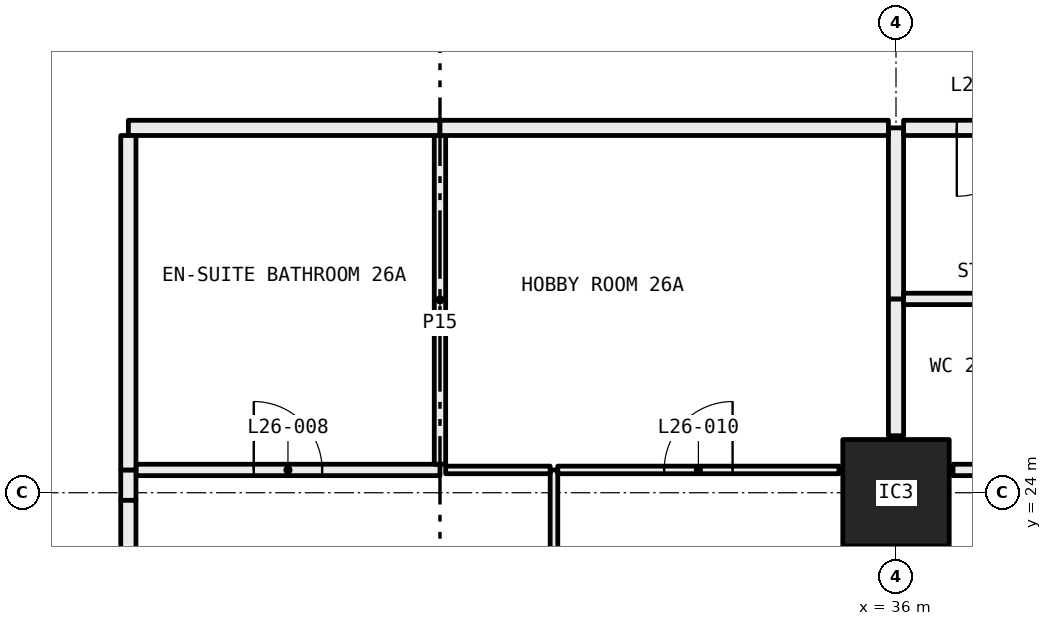
"""IFC4 building model, lengths in metres.
Left out: names, types, materials, properties, quantities, classifications, styles, units other than length and angle.
Written with IfcOpenShell. Run it as: python <this file> out.ifc"""

import sys

from ifc_helpers import new_model, si_unit, direction, frame, frame_2d, origin, origin_2d, place, context, subcontext, project, spatial, rectangle, hollow_rectangle, extrude, element, fill, save


model = new_model("IFC4")
c1 = context("Model", 3, precision=1e-05, world=origin(), true_north=direction((0.0, 1.0)))
c2 = subcontext(c1, "Body", "Model", "MODEL_VIEW")
j1 = project(units=[si_unit("LENGTHUNIT", "METRE"), si_unit("PLANEANGLEUNIT", "RADIAN")], contexts=[c1])
p1 = place(None, origin())
s1 = spatial("IfcSite", under=j1, at=p1, CompositionType="ELEMENT")
p2 = place(p1, origin())
s2 = spatial("IfcBuilding", under=s1, at=p2, CompositionType="ELEMENT")
p3 = place(p2, frame((0.0, 0.0, 103.5)))
s3 = spatial("IfcBuildingStorey", under=s2, at=p3, CompositionType="ELEMENT", Elevation=103.5)
p4 = place(p3, frame((36.0, 24.0, 0.0), z_axis=(0.0, 0.0, 1.0), x_axis=(1.0, 0.0, 0.0)))
e1 = element("IfcColumn", 1, at=p4, inside=s3, PredefinedType="COLUMN", context=c2, shape_type="SweptSolid", body=[
    extrude(hollow_rectangle(XDim=1.4, YDim=1.4, WallThickness=0.06, at=origin_2d()), origin(), (0.0, 0.0, 1.0), 3.05),
])
p5 = place(p3, frame((31.5, 18.075, 0.0), z_axis=(0.0, 0.0, 1.0), x_axis=(0.0, 1.0, 0.0)))
e2 = element("IfcWall", 2, at=p5, inside=s3, PredefinedType="PARTITIONING", context=c2, shape_type="SweptSolid", body=[
    extrude(rectangle(XDim=6.225, YDim=0.1, at=frame_2d((3.113, 0.0))), origin(), (0.0, 0.0, 1.0), 2.45),
])
p6 = place(p5, frame((2.663, 0.0, 0.0)))
e3 = element("IfcOpeningElement", 3, at=p6, cuts=e2, PredefinedType="OPENING", context=c2, shape_type="SweptSolid", body=[
    extrude(rectangle(XDim=0.9, YDim=2.1, at=frame_2d((0.45, 1.05))), frame((0.0, 0.06, 0.0), z_axis=(0.0, -1.0, 0.0), x_axis=(1.0, 0.0, 0.0)), (0.0, 0.0, 1.0), 0.12),
])
p7 = place(p3, frame((30.0, 24.3, 0.0), z_axis=(0.0, 0.0, 1.0), x_axis=(-1.0, 0.0, 0.0)))
e4 = element("IfcWall", 4, at=p7, inside=s3, PredefinedType="PARTITIONING", context=c2, shape_type="SweptSolid", body=[
    extrude(rectangle(XDim=4.0, YDim=0.15, at=frame_2d((2.0, 0.0))), origin(), (0.0, 0.0, 1.0), 3.05),
])
p8 = place(p7, frame((1.55, 0.0, 0.0)))
e5 = element("IfcOpeningElement", 5, at=p8, cuts=e4, PredefinedType="OPENING", context=c2, shape_type="SweptSolid", body=[
    extrude(rectangle(XDim=0.9, YDim=2.1, at=frame_2d((0.45, 1.05))), frame((0.0, 0.085, 0.0), z_axis=(0.0, -1.0, 0.0), x_axis=(1.0, 0.0, 0.0)), (0.0, 0.0, 1.0), 0.17),
])
p9 = place(p3, frame((31.45, 24.3, 0.0), z_axis=(0.0, 0.0, 1.0), x_axis=(-1.0, 0.0, 0.0)))
e6 = element("IfcWall", 6, at=p9, inside=s3, PredefinedType="PARTITIONING", context=c2, shape_type="SweptSolid", body=[
    extrude(rectangle(XDim=1.375, YDim=0.1, at=frame_2d((0.688, 0.0))), origin(), (0.0, 0.0, 1.0), 3.05),
])
p10 = place(p3, frame((25.9, 24.3, 0.0), z_axis=(0.0, 0.0, 1.0), x_axis=(0.0, -1.0, 0.0)))
e7 = element("IfcWall", 7, at=p10, inside=s3, PredefinedType="PARTITIONING", context=c2, shape_type="SweptSolid", body=[
    extrude(rectangle(XDim=0.4, YDim=0.2, at=frame_2d((0.2, 0.0))), origin(), (0.0, 0.0, 1.0), 2.45),
])
p11 = place(p3, frame((25.9, 23.9, 0.0), z_axis=(0.0, 0.0, 1.0), x_axis=(0.0, -1.0, 0.0)))
e8 = element("IfcWall", 8, at=p11, inside=s3, PredefinedType="PARTITIONING", context=c2, shape_type="SweptSolid", body=[
    extrude(rectangle(XDim=5.8, YDim=0.2, at=frame_2d((2.9, 0.0))), origin(), (0.0, 0.0, 1.0), 3.05),
])
p12 = place(p3, frame((35.25, 24.3, 0.0), z_axis=(0.0, 0.0, 1.0), x_axis=(-1.0, 0.0, 0.0)))
e9 = element("IfcWall", 9, at=p12, inside=s3, PredefinedType="PARTITIONING", context=c2, shape_type="SweptSolid", body=[
    extrude(rectangle(XDim=3.7, YDim=0.1, at=frame_2d((1.85, 0.0))), origin(), (0.0, 0.0, 1.0), 3.05),
])
p13 = place(p12, frame((1.4, 0.0, 0.0)))
e10 = element("IfcOpeningElement", 10, at=p13, cuts=e9, PredefinedType="OPENING", context=c2, shape_type="SweptSolid", body=[
    extrude(rectangle(XDim=0.9, YDim=2.1, at=frame_2d((0.45, 1.05))), frame((0.0, 0.06, 0.0), z_axis=(0.0, -1.0, 0.0), x_axis=(1.0, 0.0, 0.0)), (0.0, 0.0, 1.0), 0.12),
])
p14 = place(p3, frame((30.0, 24.375, 0.0), z_axis=(0.0, 0.0, 1.0), x_axis=(0.0, 1.0, 0.0)))
e11 = element("IfcWall", 11, at=p14, inside=s3, PredefinedType="PARTITIONING", context=c2, shape_type="SweptSolid", body=[
    extrude(rectangle(XDim=4.325, YDim=0.15, at=frame_2d((2.163, 0.0))), origin(), (0.0, 0.0, 1.0), 3.05),
])
p15 = place(p3, frame((30.0, 28.8, 0.0), z_axis=(0.0, 0.0, 1.0), x_axis=(-1.0, 0.0, 0.0)))
e12 = element("IfcWall", 12, at=p15, inside=s3, PredefinedType="PARTITIONING", context=c2, shape_type="SweptSolid", body=[
    extrude(rectangle(XDim=4.1, YDim=0.2, at=frame_2d((2.05, 0.0))), origin(), (0.0, 0.0, 1.0), 3.05),
])
p16 = place(p3, frame((25.9, 28.7, 0.0), z_axis=(0.0, 0.0, 1.0), x_axis=(0.0, -1.0, 0.0)))
e13 = element("IfcWall", 13, at=p16, inside=s3, PredefinedType="PARTITIONING", context=c2, shape_type="SweptSolid", body=[
    extrude(rectangle(XDim=4.4, YDim=0.2, at=frame_2d((2.2, 0.0))), origin(), (0.0, 0.0, 1.0), 3.05),
])
p17 = place(p3, frame((36.0, 24.75, 0.0), z_axis=(0.0, 0.0, 1.0), x_axis=(0.0, 1.0, 0.0)))
e14 = element("IfcWall", 14, at=p17, inside=s3, PredefinedType="PARTITIONING", context=c2, shape_type="SweptSolid", body=[
    extrude(rectangle(XDim=1.8, YDim=0.2, at=frame_2d((0.9, 0.0))), origin(), (0.0, 0.0, 1.0), 2.45),
])
p18 = place(p3, frame((36.0, 26.55, 0.0), z_axis=(0.0, 0.0, 1.0), x_axis=(0.0, 1.0, 0.0)))
e15 = element("IfcWall", 15, at=p18, inside=s3, PredefinedType="PARTITIONING", context=c2, shape_type="SweptSolid", body=[
    extrude(rectangle(XDim=2.25, YDim=0.2, at=frame_2d((1.125, 0.0))), origin(), (0.0, 0.0, 1.0), 2.45),
])
p19 = place(p3, frame((35.9, 28.8, 0.0), z_axis=(0.0, 0.0, 1.0), x_axis=(-1.0, 0.0, 0.0)))
e16 = element("IfcWall", 16, at=p19, inside=s3, PredefinedType="PARTITIONING", context=c2, shape_type="SweptSolid", body=[
    extrude(rectangle(XDim=5.9, YDim=0.2, at=frame_2d((2.95, 0.0))), origin(), (0.0, 0.0, 1.0), 3.05),
])
p20 = place(p3, frame((38.4, 24.3, 0.0), z_axis=(0.0, 0.0, 1.0), x_axis=(-1.0, 0.0, 0.0)))
e17 = element("IfcWall", 17, at=p20, inside=s3, PredefinedType="PARTITIONING", context=c2, shape_type="SweptSolid", body=[
    extrude(rectangle(XDim=1.65, YDim=0.15, at=frame_2d((0.825, 0.0))), origin(), (0.0, 0.0, 1.0), 3.05),
])
p21 = place(p20, frame((0.375, 0.0, 0.0)))
e18 = element("IfcOpeningElement", 18, at=p21, cuts=e17, PredefinedType="OPENING", context=c2, shape_type="SweptSolid", body=[
    extrude(rectangle(XDim=0.9, YDim=2.1, at=frame_2d((0.45, 1.05))), frame((0.0, 0.085, 0.0), z_axis=(0.0, -1.0, 0.0), x_axis=(1.0, 0.0, 0.0)), (0.0, 0.0, 1.0), 0.17),
])
p22 = place(p3, frame((38.4, 26.55, 0.0), z_axis=(0.0, 0.0, 1.0), x_axis=(-1.0, 0.0, 0.0)))
e19 = element("IfcWall", 19, at=p22, inside=s3, PredefinedType="PARTITIONING", context=c2, shape_type="SweptSolid", body=[
    extrude(rectangle(XDim=2.3, YDim=0.15, at=frame_2d((1.15, 0.0))), origin(), (0.0, 0.0, 1.0), 3.05),
])
p23 = place(p3, frame((38.4, 28.8, 0.0), z_axis=(0.0, 0.0, 1.0), x_axis=(-1.0, 0.0, 0.0)))
e20 = element("IfcWall", 20, at=p23, inside=s3, PredefinedType="PARTITIONING", context=c2, shape_type="SweptSolid", body=[
    extrude(rectangle(XDim=2.3, YDim=0.2, at=frame_2d((1.15, 0.0))), origin(), (0.0, 0.0, 1.0), 3.05),
])
p24 = place(p23, frame((0.7, 0.0, 0.0)))
e21 = element("IfcOpeningElement", 21, at=p24, cuts=e20, PredefinedType="OPENING", context=c2, shape_type="SweptSolid", body=[
    extrude(rectangle(XDim=0.9, YDim=2.1, at=frame_2d((0.45, 1.05))), frame((0.0, 0.11, 0.0), z_axis=(0.0, -1.0, 0.0), x_axis=(1.0, 0.0, 0.0)), (0.0, 0.0, 1.0), 0.22),
])
p25 = place(p8, frame((0.9, 0.0, 0.0), x_axis=(-1.0, 0.0, 0.0)))
e22 = element("IfcDoor", 22, at=p25, inside=s3, OperationType="SINGLE_SWING_RIGHT", PredefinedType="DOOR", context=c2, shape_type="SweptSolid", body=[
    extrude(rectangle(XDim=0.9, YDim=2.1, at=frame_2d((0.45, 1.05))), frame((0.0, 0.025, 0.0), z_axis=(0.0, -1.0, 0.0), x_axis=(1.0, 0.0, 0.0)), (0.0, 0.0, 1.0), 0.05),
])
fill(e5, e22)
p26 = place(p13, frame((0.9, 0.0, 0.0), x_axis=(-1.0, 0.0, 0.0)))
e23 = element("IfcDoor", 23, at=p26, inside=s3, OperationType="SINGLE_SWING_LEFT", PredefinedType="DOOR", context=c2, shape_type="SweptSolid", body=[
    extrude(rectangle(XDim=0.9, YDim=2.1, at=frame_2d((0.45, 1.05))), frame((0.0, 0.025, 0.0), z_axis=(0.0, -1.0, 0.0), x_axis=(1.0, 0.0, 0.0)), (0.0, 0.0, 1.0), 0.05),
])
fill(e10, e23)
p27 = place(p24, origin())
e24 = element("IfcDoor", 24, at=p27, inside=s3, OperationType="SINGLE_SWING_LEFT", PredefinedType="DOOR", context=c2, shape_type="SweptSolid", body=[
    extrude(rectangle(XDim=0.9, YDim=2.1, at=frame_2d((0.45, 1.05))), frame((0.0, 0.025, 0.0), z_axis=(0.0, -1.0, 0.0), x_axis=(1.0, 0.0, 0.0)), (0.0, 0.0, 1.0), 0.05),
])
fill(e21, e24)
save(model, sys.argv[1])
